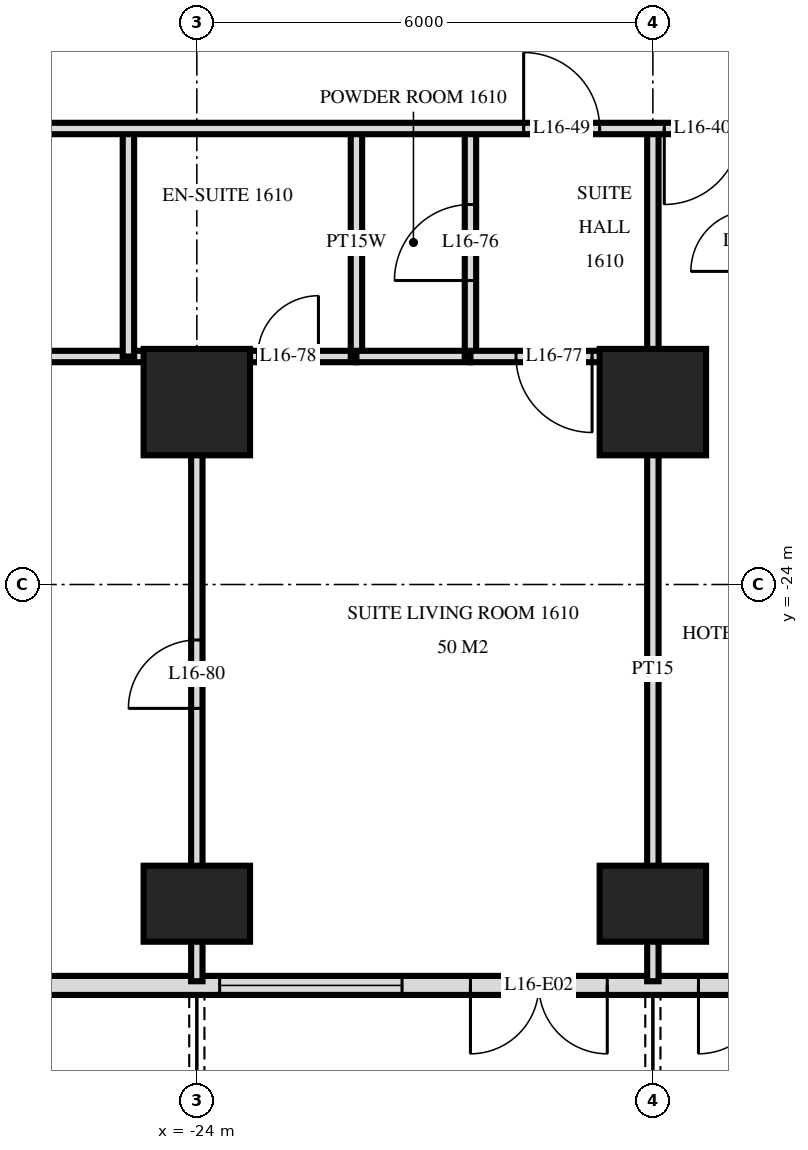
"""IFC4 building model, lengths in metres.
Left out: names, types, materials, properties, quantities, classifications, styles, units other than length and angle.
Written with IfcOpenShell. Run it as: python <this file> out.ifc"""

import sys

from ifc_helpers import new_model, si_unit, direction, frame, frame_2d, origin, origin_2d, place, context, subcontext, project, spatial, rectangle, extrude, element, fill, save


model = new_model("IFC4")
c1 = context("Model", 3, precision=1e-05, world=origin(), true_north=direction((0.0, 1.0)))
c2 = subcontext(c1, "Body", "Model", "MODEL_VIEW")
j1 = project(units=[si_unit("LENGTHUNIT", "METRE"), si_unit("PLANEANGLEUNIT", "RADIAN")], contexts=[c1])
p1 = place(None, origin())
s1 = spatial("IfcSite", under=j1, at=p1, CompositionType="ELEMENT")
p2 = place(p1, origin())
s2 = spatial("IfcBuilding", under=s1, at=p2, CompositionType="ELEMENT")
p3 = place(p2, frame((0.0, 0.0, 67.2)))
s3 = spatial("IfcBuildingStorey", under=s2, at=p3, CompositionType="ELEMENT", Elevation=67.2)
p4 = place(p3, frame((-24.0, -28.2, 0.0), z_axis=(0.0, 0.0, 1.0), x_axis=(1.0, 0.0, 0.0)))
e1 = element("IfcColumn", 1, at=p4, inside=s3, PredefinedType="COLUMN", context=c2, shape_type="SweptSolid", body=[
    extrude(rectangle(XDim=1.4, YDim=1.0, at=origin_2d()), origin(), (0.0, 0.0, 1.0), 3.6),
])
p5 = place(p3, frame((-24.0, -21.6, 0.0), z_axis=(0.0, 0.0, 1.0), x_axis=(1.0, 0.0, 0.0)))
e2 = element("IfcColumn", 2, at=p5, inside=s3, PredefinedType="COLUMN", context=c2, shape_type="SweptSolid", body=[
    extrude(rectangle(XDim=1.4, YDim=1.4, at=origin_2d()), origin(), (0.0, 0.0, 1.0), 3.6),
])
p6 = place(p3, frame((-18.0, -28.2, 0.0), z_axis=(0.0, 0.0, 1.0), x_axis=(1.0, 0.0, 0.0)))
e3 = element("IfcColumn", 3, at=p6, inside=s3, PredefinedType="COLUMN", context=c2, shape_type="SweptSolid", body=[
    extrude(rectangle(XDim=1.4, YDim=1.0, at=origin_2d()), origin(), (0.0, 0.0, 1.0), 3.6),
])
p7 = place(p3, frame((-18.0, -21.6, 0.0), z_axis=(0.0, 0.0, 1.0), x_axis=(1.0, 0.0, 0.0)))
e4 = element("IfcColumn", 4, at=p7, inside=s3, PredefinedType="COLUMN", context=c2, shape_type="SweptSolid", body=[
    extrude(rectangle(XDim=1.4, YDim=1.4, at=origin_2d()), origin(), (0.0, 0.0, 1.0), 3.6),
])
p8 = place(p3, frame((-28.775, -29.275, 0.0), z_axis=(0.0, 0.0, 1.0), x_axis=(1.0, 0.0, 0.0)))
e5 = element("IfcWall", 5, at=p8, inside=s3, PredefinedType="SOLIDWALL", context=c2, shape_type="SweptSolid", body=[
    extrude(rectangle(XDim=57.551, YDim=0.25, at=frame_2d((28.775, 0.0))), origin(), (0.0, 0.0, 1.0), 3.32),
])
p9 = place(p8, frame((0.575, 0.0, 0.0)))
e6 = element("IfcOpeningElement", 6, at=p9, cuts=e5, PredefinedType="OPENING", context=c2, shape_type="SweptSolid", body=[
    extrude(rectangle(XDim=1.8, YDim=2.4, at=frame_2d((0.9, 1.2))), frame((0.0, 0.135, 0.0), z_axis=(0.0, -1.0, 0.0), x_axis=(1.0, 0.0, 0.0)), (0.0, 0.0, 1.0), 0.27),
])
p10 = place(p8, frame((5.075, 0.0, 0.3)))
e7 = element("IfcOpeningElement", 7, at=p10, cuts=e5, PredefinedType="OPENING", context=c2, shape_type="SweptSolid", body=[
    extrude(rectangle(XDim=2.4, YDim=2.1, at=frame_2d((1.2, 1.05))), frame((0.0, 0.135, 0.0), z_axis=(0.0, -1.0, 0.0), x_axis=(1.0, 0.0, 0.0)), (0.0, 0.0, 1.0), 0.27),
])
p11 = place(p8, frame((8.375, 0.0, 0.0)))
e8 = element("IfcOpeningElement", 8, at=p11, cuts=e5, PredefinedType="OPENING", context=c2, shape_type="SweptSolid", body=[
    extrude(rectangle(XDim=1.8, YDim=2.4, at=frame_2d((0.9, 1.2))), frame((0.0, 0.135, 0.0), z_axis=(0.0, -1.0, 0.0), x_axis=(1.0, 0.0, 0.0)), (0.0, 0.0, 1.0), 0.27),
])
p12 = place(p8, frame((11.375, 0.0, 0.0)))
e9 = element("IfcOpeningElement", 9, at=p12, cuts=e5, PredefinedType="OPENING", context=c2, shape_type="SweptSolid", body=[
    extrude(rectangle(XDim=1.8, YDim=2.4, at=frame_2d((0.9, 1.2))), frame((0.0, 0.135, 0.0), z_axis=(0.0, -1.0, 0.0), x_axis=(1.0, 0.0, 0.0)), (0.0, 0.0, 1.0), 0.27),
])
p13 = place(p8, frame((14.075, 0.0, 0.3)))
e10 = element("IfcOpeningElement", 10, at=p13, cuts=e5, PredefinedType="OPENING", context=c2, shape_type="SweptSolid", body=[
    extrude(rectangle(XDim=2.4, YDim=2.1, at=frame_2d((1.2, 1.05))), frame((0.0, 0.135, 0.0), z_axis=(0.0, -1.0, 0.0), x_axis=(1.0, 0.0, 0.0)), (0.0, 0.0, 1.0), 0.27),
])
p14 = place(p8, frame((17.375, 0.0, 0.0)))
e11 = element("IfcOpeningElement", 11, at=p14, cuts=e5, PredefinedType="OPENING", context=c2, shape_type="SweptSolid", body=[
    extrude(rectangle(XDim=1.8, YDim=2.4, at=frame_2d((0.9, 1.2))), frame((0.0, 0.135, 0.0), z_axis=(0.0, -1.0, 0.0), x_axis=(1.0, 0.0, 0.0)), (0.0, 0.0, 1.0), 0.27),
])
p15 = place(p8, frame((20.075, 0.0, 0.3)))
e12 = element("IfcOpeningElement", 12, at=p15, cuts=e5, PredefinedType="OPENING", context=c2, shape_type="SweptSolid", body=[
    extrude(rectangle(XDim=2.4, YDim=2.1, at=frame_2d((1.2, 1.05))), frame((0.0, 0.135, 0.0), z_axis=(0.0, -1.0, 0.0), x_axis=(1.0, 0.0, 0.0)), (0.0, 0.0, 1.0), 0.27),
])
p16 = place(p8, frame((23.075, 0.0, 0.3)))
e13 = element("IfcOpeningElement", 13, at=p16, cuts=e5, PredefinedType="OPENING", context=c2, shape_type="SweptSolid", body=[
    extrude(rectangle(XDim=2.4, YDim=2.1, at=frame_2d((1.2, 1.05))), frame((0.0, 0.135, 0.0), z_axis=(0.0, -1.0, 0.0), x_axis=(1.0, 0.0, 0.0)), (0.0, 0.0, 1.0), 0.27),
])
p17 = place(p8, frame((26.375, 0.0, 0.0)))
e14 = element("IfcOpeningElement", 14, at=p17, cuts=e5, PredefinedType="OPENING", context=c2, shape_type="SweptSolid", body=[
    extrude(rectangle(XDim=1.8, YDim=2.4, at=frame_2d((0.9, 1.2))), frame((0.0, 0.135, 0.0), z_axis=(0.0, -1.0, 0.0), x_axis=(1.0, 0.0, 0.0)), (0.0, 0.0, 1.0), 0.27),
])
p18 = place(p8, frame((29.375, 0.0, 0.0)))
e15 = element("IfcOpeningElement", 15, at=p18, cuts=e5, PredefinedType="OPENING", context=c2, shape_type="SweptSolid", body=[
    extrude(rectangle(XDim=1.8, YDim=2.4, at=frame_2d((0.9, 1.2))), frame((0.0, 0.135, 0.0), z_axis=(0.0, -1.0, 0.0), x_axis=(1.0, 0.0, 0.0)), (0.0, 0.0, 1.0), 0.27),
])
p19 = place(p8, frame((32.075, 0.0, 0.3)))
e16 = element("IfcOpeningElement", 16, at=p19, cuts=e5, PredefinedType="OPENING", context=c2, shape_type="SweptSolid", body=[
    extrude(rectangle(XDim=2.4, YDim=2.1, at=frame_2d((1.2, 1.05))), frame((0.0, 0.135, 0.0), z_axis=(0.0, -1.0, 0.0), x_axis=(1.0, 0.0, 0.0)), (0.0, 0.0, 1.0), 0.27),
])
p20 = place(p8, frame((35.375, 0.0, 0.0)))
e17 = element("IfcOpeningElement", 17, at=p20, cuts=e5, PredefinedType="OPENING", context=c2, shape_type="SweptSolid", body=[
    extrude(rectangle(XDim=1.8, YDim=2.4, at=frame_2d((0.9, 1.2))), frame((0.0, 0.135, 0.0), z_axis=(0.0, -1.0, 0.0), x_axis=(1.0, 0.0, 0.0)), (0.0, 0.0, 1.0), 0.27),
])
p21 = place(p8, frame((38.075, 0.0, 0.3)))
e18 = element("IfcOpeningElement", 18, at=p21, cuts=e5, PredefinedType="OPENING", context=c2, shape_type="SweptSolid", body=[
    extrude(rectangle(XDim=2.4, YDim=2.1, at=frame_2d((1.2, 1.05))), frame((0.0, 0.135, 0.0), z_axis=(0.0, -1.0, 0.0), x_axis=(1.0, 0.0, 0.0)), (0.0, 0.0, 1.0), 0.27),
])
p22 = place(p8, frame((41.075, 0.0, 0.3)))
e19 = element("IfcOpeningElement", 19, at=p22, cuts=e5, PredefinedType="OPENING", context=c2, shape_type="SweptSolid", body=[
    extrude(rectangle(XDim=2.4, YDim=2.1, at=frame_2d((1.2, 1.05))), frame((0.0, 0.135, 0.0), z_axis=(0.0, -1.0, 0.0), x_axis=(1.0, 0.0, 0.0)), (0.0, 0.0, 1.0), 0.27),
])
p23 = place(p8, frame((44.375, 0.0, 0.0)))
e20 = element("IfcOpeningElement", 20, at=p23, cuts=e5, PredefinedType="OPENING", context=c2, shape_type="SweptSolid", body=[
    extrude(rectangle(XDim=1.8, YDim=2.4, at=frame_2d((0.9, 1.2))), frame((0.0, 0.135, 0.0), z_axis=(0.0, -1.0, 0.0), x_axis=(1.0, 0.0, 0.0)), (0.0, 0.0, 1.0), 0.27),
])
p24 = place(p8, frame((47.075, 0.0, 0.3)))
e21 = element("IfcOpeningElement", 21, at=p24, cuts=e5, PredefinedType="OPENING", context=c2, shape_type="SweptSolid", body=[
    extrude(rectangle(XDim=2.4, YDim=2.1, at=frame_2d((1.2, 1.05))), frame((0.0, 0.135, 0.0), z_axis=(0.0, -1.0, 0.0), x_axis=(1.0, 0.0, 0.0)), (0.0, 0.0, 1.0), 0.27),
])
p25 = place(p8, frame((50.375, 0.0, 0.0)))
e22 = element("IfcOpeningElement", 22, at=p25, cuts=e5, PredefinedType="OPENING", context=c2, shape_type="SweptSolid", body=[
    extrude(rectangle(XDim=1.8, YDim=2.4, at=frame_2d((0.9, 1.2))), frame((0.0, 0.135, 0.0), z_axis=(0.0, -1.0, 0.0), x_axis=(1.0, 0.0, 0.0)), (0.0, 0.0, 1.0), 0.27),
])
p26 = place(p8, frame((53.375, 0.0, 0.0)))
e23 = element("IfcOpeningElement", 23, at=p26, cuts=e5, PredefinedType="OPENING", context=c2, shape_type="SweptSolid", body=[
    extrude(rectangle(XDim=1.8, YDim=2.4, at=frame_2d((0.9, 1.2))), frame((0.0, 0.135, 0.0), z_axis=(0.0, -1.0, 0.0), x_axis=(1.0, 0.0, 0.0)), (0.0, 0.0, 1.0), 0.27),
])
p27 = place(p3, frame((-18.0, -21.0, 0.0), z_axis=(0.0, 0.0, 1.0), x_axis=(0.0, 1.0, 0.0)))
e24 = element("IfcWall", 24, at=p27, inside=s3, PredefinedType="PARTITIONING", context=c2, shape_type="SweptSolid", body=[
    extrude(rectangle(XDim=3.0, YDim=0.15, at=frame_2d((1.5, 0.0))), origin(), (0.0, 0.0, 1.0), 3.32),
])
p28 = place(p3, frame((-18.0, -29.22, 0.0), z_axis=(0.0, 0.0, 1.0), x_axis=(0.0, 1.0, 0.0)))
e25 = element("IfcWall", 25, at=p28, inside=s3, PredefinedType="PARTITIONING", context=c2, shape_type="SweptSolid", body=[
    extrude(rectangle(XDim=8.22, YDim=0.15, at=frame_2d((4.11, 0.0))), origin(), (0.0, 0.0, 1.0), 3.32),
])
p29 = place(p3, frame((-20.4, -21.0, 0.0), z_axis=(0.0, 0.0, 1.0), x_axis=(0.0, 1.0, 0.0)))
e26 = element("IfcWall", 26, at=p29, inside=s3, PredefinedType="PARTITIONING", context=c2, shape_type="SweptSolid", body=[
    extrude(rectangle(XDim=3.0, YDim=0.15, at=frame_2d((1.5, 0.0))), origin(), (0.0, 0.0, 1.0), 3.32),
])
p30 = place(p29, frame((1.0, 0.0, 0.0)))
e27 = element("IfcOpeningElement", 27, at=p30, cuts=e26, PredefinedType="OPENING", context=c2, shape_type="SweptSolid", body=[
    extrude(rectangle(XDim=1.0, YDim=2.1, at=frame_2d((0.5, 1.05))), frame((0.0, 0.085, 0.0), z_axis=(0.0, -1.0, 0.0), x_axis=(1.0, 0.0, 0.0)), (0.0, 0.0, 1.0), 0.17),
])
p31 = place(p3, frame((-21.9, -21.0, 0.0), z_axis=(0.0, 0.0, 1.0), x_axis=(0.0, 1.0, 0.0)))
e28 = element("IfcWall", 28, at=p31, inside=s3, PredefinedType="PLUMBINGWALL", context=c2, shape_type="SweptSolid", body=[
    extrude(rectangle(XDim=3.0, YDim=0.15, at=frame_2d((1.5, 0.0))), origin(), (0.0, 0.0, 1.0), 3.32),
])
p32 = place(p3, frame((-24.0, -29.22, 0.0), z_axis=(0.0, 0.0, 1.0), x_axis=(0.0, 1.0, 0.0)))
e29 = element("IfcWall", 29, at=p32, inside=s3, PredefinedType="PARTITIONING", context=c2, shape_type="SweptSolid", body=[
    extrude(rectangle(XDim=8.22, YDim=0.15, at=frame_2d((4.11, 0.0))), origin(), (0.0, 0.0, 1.0), 3.32),
])
p33 = place(p32, frame((3.59, 0.0, 0.0)))
e30 = element("IfcOpeningElement", 30, at=p33, cuts=e29, PredefinedType="OPENING", context=c2, shape_type="SweptSolid", body=[
    extrude(rectangle(XDim=0.9, YDim=2.1, at=frame_2d((0.45, 1.05))), frame((0.0, 0.085, 0.0), z_axis=(0.0, -1.0, 0.0), x_axis=(1.0, 0.0, 0.0)), (0.0, 0.0, 1.0), 0.17),
])
p34 = place(p3, frame((-24.9, -21.0, 0.0), z_axis=(0.0, 0.0, 1.0), x_axis=(0.0, 1.0, 0.0)))
e31 = element("IfcWall", 31, at=p34, inside=s3, PredefinedType="PARTITIONING", context=c2, shape_type="SweptSolid", body=[
    extrude(rectangle(XDim=3.0, YDim=0.15, at=frame_2d((1.5, 0.0))), origin(), (0.0, 0.0, 1.0), 3.32),
])
p35 = place(p3, frame((-20.4, -21.0, 0.0), z_axis=(0.0, 0.0, 1.0), x_axis=(1.0, 0.0, 0.0)))
e32 = element("IfcWall", 32, at=p35, inside=s3, PredefinedType="PARTITIONING", context=c2, shape_type="SweptSolid", body=[
    extrude(rectangle(XDim=2.4, YDim=0.15, at=frame_2d((1.2, 0.0))), origin(), (0.0, 0.0, 1.0), 3.32),
])
p36 = place(p35, frame((0.6, 0.0, 0.0)))
e33 = element("IfcOpeningElement", 33, at=p36, cuts=e32, PredefinedType="OPENING", context=c2, shape_type="SweptSolid", body=[
    extrude(rectangle(XDim=1.0, YDim=2.1, at=frame_2d((0.5, 1.05))), frame((0.0, 0.085, 0.0), z_axis=(0.0, -1.0, 0.0), x_axis=(1.0, 0.0, 0.0)), (0.0, 0.0, 1.0), 0.17),
])
p37 = place(p3, frame((-33.12, -21.0, 0.0), z_axis=(0.0, 0.0, 1.0), x_axis=(1.0, 0.0, 0.0)))
e34 = element("IfcWall", 34, at=p37, inside=s3, PredefinedType="PARTITIONING", context=c2, shape_type="SweptSolid", body=[
    extrude(rectangle(XDim=11.22, YDim=0.15, at=frame_2d((5.61, 0.0))), origin(), (0.0, 0.0, 1.0), 3.32),
])
p38 = place(p37, frame((9.92, 0.0, 0.0)))
e35 = element("IfcOpeningElement", 35, at=p38, cuts=e34, PredefinedType="OPENING", context=c2, shape_type="SweptSolid", body=[
    extrude(rectangle(XDim=0.8, YDim=2.1, at=frame_2d((0.4, 1.05))), frame((0.0, 0.085, 0.0), z_axis=(0.0, -1.0, 0.0), x_axis=(1.0, 0.0, 0.0)), (0.0, 0.0, 1.0), 0.17),
])
p39 = place(p37, frame((3.92, 0.0, 0.0)))
e36 = element("IfcOpeningElement", 36, at=p39, cuts=e34, PredefinedType="OPENING", context=c2, shape_type="SweptSolid", body=[
    extrude(rectangle(XDim=0.9, YDim=2.1, at=frame_2d((0.45, 1.05))), frame((0.0, 0.085, 0.0), z_axis=(0.0, -1.0, 0.0), x_axis=(1.0, 0.0, 0.0)), (0.0, 0.0, 1.0), 0.17),
])
p40 = place(p3, frame((-21.9, -21.0, 0.0), z_axis=(0.0, 0.0, 1.0), x_axis=(1.0, 0.0, 0.0)))
e37 = element("IfcWall", 37, at=p40, inside=s3, PredefinedType="PLUMBINGWALL", context=c2, shape_type="SweptSolid", body=[
    extrude(rectangle(XDim=1.5, YDim=0.15, at=frame_2d((0.75, 0.0))), origin(), (0.0, 0.0, 1.0), 3.32),
])
p41 = place(p3, frame((-33.12, -18.0, 0.0), z_axis=(0.0, 0.0, 1.0), x_axis=(1.0, 0.0, 0.0)))
e38 = element("IfcWall", 38, at=p41, inside=s3, PredefinedType="PARTITIONING", context=c2, shape_type="SweptSolid", body=[
    extrude(rectangle(XDim=66.24, YDim=0.15, at=frame_2d((33.12, 0.0))), origin(), (0.0, 0.0, 1.0), 3.32),
])
p42 = place(p41, frame((15.27, 0.0, 0.0)))
e39 = element("IfcOpeningElement", 39, at=p42, cuts=e38, PredefinedType="OPENING", context=c2, shape_type="SweptSolid", body=[
    extrude(rectangle(XDim=1.0, YDim=2.1, at=frame_2d((0.5, 1.05))), frame((0.0, 0.085, 0.0), z_axis=(0.0, -1.0, 0.0), x_axis=(1.0, 0.0, 0.0)), (0.0, 0.0, 1.0), 0.17),
])
p43 = place(p41, frame((21.22, 0.0, 0.0)))
e40 = element("IfcOpeningElement", 40, at=p43, cuts=e38, PredefinedType="OPENING", context=c2, shape_type="SweptSolid", body=[
    extrude(rectangle(XDim=1.0, YDim=2.1, at=frame_2d((0.5, 1.05))), frame((0.0, 0.085, 0.0), z_axis=(0.0, -1.0, 0.0), x_axis=(1.0, 0.0, 0.0)), (0.0, 0.0, 1.0), 0.17),
])
p44 = place(p41, frame((24.27, 0.0, 0.0)))
e41 = element("IfcOpeningElement", 41, at=p44, cuts=e38, PredefinedType="OPENING", context=c2, shape_type="SweptSolid", body=[
    extrude(rectangle(XDim=1.0, YDim=2.1, at=frame_2d((0.5, 1.05))), frame((0.0, 0.085, 0.0), z_axis=(0.0, -1.0, 0.0), x_axis=(1.0, 0.0, 0.0)), (0.0, 0.0, 1.0), 0.17),
])
p45 = place(p41, frame((30.97, 0.0, 0.0)))
e42 = element("IfcOpeningElement", 42, at=p45, cuts=e38, PredefinedType="OPENING", context=c2, shape_type="SweptSolid", body=[
    extrude(rectangle(XDim=1.0, YDim=2.1, at=frame_2d((0.5, 1.05))), frame((0.0, 0.085, 0.0), z_axis=(0.0, -1.0, 0.0), x_axis=(1.0, 0.0, 0.0)), (0.0, 0.0, 1.0), 0.17),
])
p46 = place(p41, frame((40.42, 0.0, 0.0)))
e43 = element("IfcOpeningElement", 43, at=p46, cuts=e38, PredefinedType="OPENING", context=c2, shape_type="SweptSolid", body=[
    extrude(rectangle(XDim=1.0, YDim=2.1, at=frame_2d((0.5, 1.05))), frame((0.0, 0.085, 0.0), z_axis=(0.0, -1.0, 0.0), x_axis=(1.0, 0.0, 0.0)), (0.0, 0.0, 1.0), 0.17),
])
p47 = place(p41, frame((43.97, 0.0, 0.0)))
e44 = element("IfcOpeningElement", 44, at=p47, cuts=e38, PredefinedType="OPENING", context=c2, shape_type="SweptSolid", body=[
    extrude(rectangle(XDim=1.0, YDim=2.1, at=frame_2d((0.5, 1.05))), frame((0.0, 0.085, 0.0), z_axis=(0.0, -1.0, 0.0), x_axis=(1.0, 0.0, 0.0)), (0.0, 0.0, 1.0), 0.17),
])
p48 = place(p41, frame((45.52, 0.0, 0.0)))
e45 = element("IfcOpeningElement", 45, at=p48, cuts=e38, PredefinedType="OPENING", context=c2, shape_type="SweptSolid", body=[
    extrude(rectangle(XDim=1.0, YDim=2.1, at=frame_2d((0.5, 1.05))), frame((0.0, 0.085, 0.0), z_axis=(0.0, -1.0, 0.0), x_axis=(1.0, 0.0, 0.0)), (0.0, 0.0, 1.0), 0.17),
])
p49 = place(p41, frame((52.97, 0.0, 0.0)))
e46 = element("IfcOpeningElement", 46, at=p49, cuts=e38, PredefinedType="OPENING", context=c2, shape_type="SweptSolid", body=[
    extrude(rectangle(XDim=1.0, YDim=2.1, at=frame_2d((0.5, 1.05))), frame((0.0, 0.085, 0.0), z_axis=(0.0, -1.0, 0.0), x_axis=(1.0, 0.0, 0.0)), (0.0, 0.0, 1.0), 0.17),
])
p50 = place(p41, frame((54.27, 0.0, 0.0)))
e47 = element("IfcOpeningElement", 47, at=p50, cuts=e38, PredefinedType="OPENING", context=c2, shape_type="SweptSolid", body=[
    extrude(rectangle(XDim=1.0, YDim=2.1, at=frame_2d((0.5, 1.05))), frame((0.0, 0.085, 0.0), z_axis=(0.0, -1.0, 0.0), x_axis=(1.0, 0.0, 0.0)), (0.0, 0.0, 1.0), 0.17),
])
p51 = place(p41, frame((13.42, 0.0, 0.0)))
e48 = element("IfcOpeningElement", 48, at=p51, cuts=e38, PredefinedType="OPENING", context=c2, shape_type="SweptSolid", body=[
    extrude(rectangle(XDim=1.0, YDim=2.1, at=frame_2d((0.5, 1.05))), frame((0.0, 0.085, 0.0), z_axis=(0.0, -1.0, 0.0), x_axis=(1.0, 0.0, 0.0)), (0.0, 0.0, 1.0), 0.17),
])
p52 = place(p41, frame((60.82, 0.0, 0.0)))
e49 = element("IfcOpeningElement", 49, at=p52, cuts=e38, PredefinedType="OPENING", context=c2, shape_type="SweptSolid", body=[
    extrude(rectangle(XDim=1.0, YDim=2.1, at=frame_2d((0.5, 1.05))), frame((0.0, 0.085, 0.0), z_axis=(0.0, -1.0, 0.0), x_axis=(1.0, 0.0, 0.0)), (0.0, 0.0, 1.0), 0.17),
])
p53 = place(p10, origin())
e50 = element("IfcWindow", 50, at=p53, inside=s3, PartitioningType="SINGLE_PANEL", PredefinedType="WINDOW", context=c2, shape_type="SweptSolid", body=[
    extrude(rectangle(XDim=2.4, YDim=2.1, at=frame_2d((1.2, 1.05))), frame((0.0, 0.03, 0.0), z_axis=(0.0, -1.0, 0.0), x_axis=(1.0, 0.0, 0.0)), (0.0, 0.0, 1.0), 0.06),
])
fill(e7, e50)
p54 = place(p11, frame((0.9, 0.0, 0.0), z_axis=(0.0, 0.0, 1.0), x_axis=(-1.0, 0.0, 0.0)))
e51 = element("IfcDoor", 51, at=p54, inside=s3, OperationType="DOUBLE_DOOR_SINGLE_SWING", PredefinedType="DOOR", context=c2, shape_type="SweptSolid", body=[
    extrude(rectangle(XDim=1.8, YDim=2.4, at=frame_2d((0.0, 1.2))), frame((0.0, -0.025, 0.0), z_axis=(0.0, 1.0, 0.0), x_axis=(-1.0, 0.0, 0.0)), (0.0, 0.0, 1.0), 0.05),
])
fill(e8, e51)
p55 = place(p12, frame((0.9, 0.0, 0.0), z_axis=(0.0, 0.0, 1.0), x_axis=(-1.0, 0.0, 0.0)))
e52 = element("IfcDoor", 52, at=p55, inside=s3, OperationType="DOUBLE_DOOR_SINGLE_SWING", PredefinedType="DOOR", context=c2, shape_type="SweptSolid", body=[
    extrude(rectangle(XDim=1.8, YDim=2.4, at=frame_2d((0.0, 1.2))), frame((0.0, -0.025, 0.0), z_axis=(0.0, 1.0, 0.0), x_axis=(-1.0, 0.0, 0.0)), (0.0, 0.0, 1.0), 0.05),
])
fill(e9, e52)
p56 = place(p42, frame((0.5, 0.0, 0.0), z_axis=(0.0, 0.0, 1.0), x_axis=(-1.0, 0.0, 0.0)))
e53 = element("IfcDoor", 53, at=p56, inside=s3, OperationType="SINGLE_SWING_LEFT", PredefinedType="DOOR", context=c2, shape_type="SweptSolid", body=[
    extrude(rectangle(XDim=1.0, YDim=2.1, at=frame_2d((0.0, 1.05))), frame((0.0, -0.025, 0.0), z_axis=(0.0, 1.0, 0.0), x_axis=(-1.0, 0.0, 0.0)), (0.0, 0.0, 1.0), 0.05),
])
fill(e39, e53)
p57 = place(p51, origin())
e54 = element("IfcDoor", 54, at=p57, inside=s3, OperationType="SINGLE_SWING_RIGHT", PredefinedType="DOOR", context=c2, shape_type="SweptSolid", body=[
    extrude(rectangle(XDim=1.0, YDim=2.1, at=frame_2d((0.5, 1.05))), frame((0.0, 0.025, 0.0), z_axis=(0.0, -1.0, 0.0), x_axis=(1.0, 0.0, 0.0)), (0.0, 0.0, 1.0), 0.05),
])
fill(e48, e54)
p58 = place(p30, origin())
e55 = element("IfcDoor", 55, at=p58, inside=s3, OperationType="SINGLE_SWING_RIGHT", PredefinedType="DOOR", context=c2, shape_type="SweptSolid", body=[
    extrude(rectangle(XDim=1.0, YDim=2.1, at=frame_2d((0.5, 1.05))), frame((0.0, 0.025, 0.0), z_axis=(0.0, -1.0, 0.0), x_axis=(1.0, 0.0, 0.0)), (0.0, 0.0, 1.0), 0.05),
])
fill(e27, e55)
p59 = place(p36, frame((0.5, 0.0, 0.0), z_axis=(0.0, 0.0, 1.0), x_axis=(-1.0, 0.0, 0.0)))
e56 = element("IfcDoor", 56, at=p59, inside=s3, OperationType="SINGLE_SWING_RIGHT", PredefinedType="DOOR", context=c2, shape_type="SweptSolid", body=[
    extrude(rectangle(XDim=1.0, YDim=2.1, at=frame_2d((0.0, 1.05))), frame((0.0, -0.025, 0.0), z_axis=(0.0, 1.0, 0.0), x_axis=(-1.0, 0.0, 0.0)), (0.0, 0.0, 1.0), 0.05),
])
fill(e33, e56)
p60 = place(p38, origin())
e57 = element("IfcDoor", 57, at=p60, inside=s3, OperationType="SINGLE_SWING_LEFT", PredefinedType="DOOR", context=c2, shape_type="SweptSolid", body=[
    extrude(rectangle(XDim=0.8, YDim=2.1, at=frame_2d((0.4, 1.05))), frame((0.0, 0.025, 0.0), z_axis=(0.0, -1.0, 0.0), x_axis=(1.0, 0.0, 0.0)), (0.0, 0.0, 1.0), 0.05),
])
fill(e35, e57)
p61 = place(p33, origin())
e58 = element("IfcDoor", 58, at=p61, inside=s3, OperationType="SINGLE_SWING_RIGHT", PredefinedType="DOOR", context=c2, shape_type="SweptSolid", body=[
    extrude(rectangle(XDim=0.9, YDim=2.1, at=frame_2d((0.45, 1.05))), frame((0.0, 0.025, 0.0), z_axis=(0.0, -1.0, 0.0), x_axis=(1.0, 0.0, 0.0)), (0.0, 0.0, 1.0), 0.05),
])
fill(e30, e58)
save(model, sys.argv[1])
